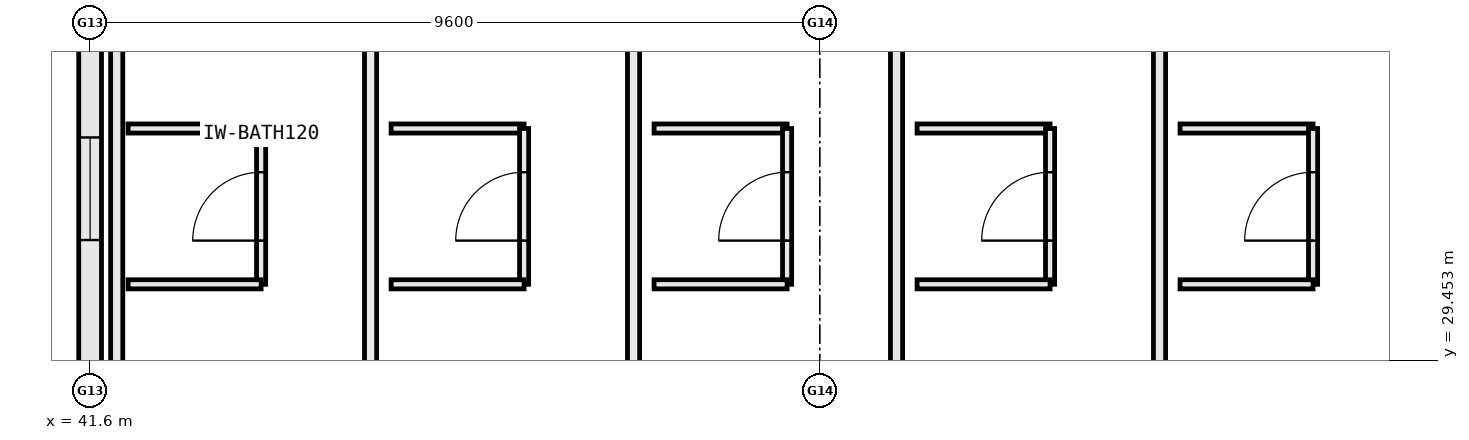
"""IFC4 building model, lengths in metres.
Left out: names, types, materials, properties, quantities, classifications, styles, units other than length and angle.
Written with IfcOpenShell. Run it as: python <this file> out.ifc"""

import sys

from ifc_helpers import new_model, si_unit, direction, frame, frame_2d, origin, place, context, subcontext, project, spatial, rectangle, extrude, element, fill, save


model = new_model("IFC4")
c1 = context("Model", 3, precision=1e-05, world=origin(), true_north=direction((0.0, 1.0)))
c2 = subcontext(c1, "Body", "Model", "MODEL_VIEW")
j1 = project(units=[si_unit("LENGTHUNIT", "METRE"), si_unit("PLANEANGLEUNIT", "RADIAN")], contexts=[c1])
p1 = place(None, origin())
s1 = spatial("IfcSite", under=j1, at=p1, CompositionType="ELEMENT")
p2 = place(p1, origin())
s2 = spatial("IfcBuilding", under=s1, at=p2, CompositionType="ELEMENT")
p3 = place(p2, frame((0.0, 0.0, 27.6)))
s3 = spatial("IfcBuildingStorey", under=s2, at=p3, CompositionType="ELEMENT", Elevation=27.6)
p4 = place(p3, frame((41.6, 36.192, 0.0), z_axis=(0.0, 0.0, 1.0), x_axis=(0.0, -1.0, 0.0)))
e1 = element("IfcWall", 1, at=p4, inside=s3, PredefinedType="STANDARD", context=c2, shape_type="SweptSolid", body=[
    extrude(rectangle(XDim=8.969, YDim=0.3, at=frame_2d((4.484, 0.0))), origin(), (0.0, 0.0, 1.0), 2.93),
])
p5 = place(p4, frame((3.81, 0.0, 0.85)))
e2 = element("IfcOpeningElement", 2, at=p5, cuts=e1, PredefinedType="OPENING", context=c2, shape_type="SweptSolid", body=[
    extrude(rectangle(XDim=1.35, YDim=1.65, at=frame_2d((0.675, 0.825))), frame((0.0, 0.162, 0.0), z_axis=(0.0, -1.0, 0.0), x_axis=(1.0, 0.0, 0.0)), (0.0, 0.0, 1.0), 0.324),
])
p6 = place(p3, frame((41.95, 27.16, 0.0), z_axis=(0.0, 0.0, 1.0), x_axis=(0.0, 1.0, 0.0)))
e3 = element("IfcWall", 3, at=p6, inside=s3, PredefinedType="PARTITIONING", context=c2, shape_type="SweptSolid", body=[
    extrude(rectangle(XDim=10.34, YDim=0.16, at=frame_2d((5.17, 0.0))), origin(), (0.0, 0.0, 1.0), 2.91),
])
p7 = place(p3, frame((45.29, 27.16, 0.0), z_axis=(0.0, 0.0, 1.0), x_axis=(0.0, 1.0, 0.0)))
e4 = element("IfcWall", 4, at=p7, inside=s3, PredefinedType="PARTITIONING", context=c2, shape_type="SweptSolid", body=[
    extrude(rectangle(XDim=10.34, YDim=0.16, at=frame_2d((5.17, 0.0))), origin(), (0.0, 0.0, 1.0), 3.555),
])
p8 = place(p3, frame((42.1, 32.5, 0.0), z_axis=(0.0, 0.0, 1.0), x_axis=(1.0, 0.0, 0.0)))
e5 = element("IfcWall", 5, at=p8, inside=s3, PredefinedType="PARTITIONING", context=c2, shape_type="SweptSolid", body=[
    extrude(rectangle(XDim=1.75, YDim=0.12, at=frame_2d((0.875, 0.0))), origin(), (0.0, 0.0, 1.0), 3.555),
])
p9 = place(p3, frame((43.85, 30.45, 0.0), z_axis=(0.0, 0.0, 1.0), x_axis=(0.0, 1.0, 0.0)))
e6 = element("IfcWall", 6, at=p9, inside=s3, PredefinedType="PARTITIONING", context=c2, shape_type="SweptSolid", body=[
    extrude(rectangle(XDim=2.05, YDim=0.12, at=frame_2d((1.025, 0.0))), origin(), (0.0, 0.0, 1.0), 3.1),
])
p10 = place(p9, frame((0.575, 0.0, 0.0)))
e7 = element("IfcOpeningElement", 7, at=p10, cuts=e6, PredefinedType="OPENING", context=c2, shape_type="SweptSolid", body=[
    extrude(rectangle(XDim=0.9, YDim=2.15, at=frame_2d((0.45, 1.075))), frame((0.0, 0.072, 0.0), z_axis=(0.0, -1.0, 0.0), x_axis=(1.0, 0.0, 0.0)), (0.0, 0.0, 1.0), 0.144),
])
p11 = place(p3, frame((42.1, 30.45, 0.0), z_axis=(0.0, 0.0, 1.0), x_axis=(1.0, 0.0, 0.0)))
e8 = element("IfcWall", 8, at=p11, inside=s3, PredefinedType="PARTITIONING", context=c2, shape_type="SweptSolid", body=[
    extrude(rectangle(XDim=1.75, YDim=0.12, at=frame_2d((0.875, 0.0))), origin(), (0.0, 0.0, 1.0), 3.555),
])
p12 = place(p3, frame((48.75, 27.16, 0.0), z_axis=(0.0, 0.0, 1.0), x_axis=(0.0, 1.0, 0.0)))
e9 = element("IfcWall", 9, at=p12, inside=s3, PredefinedType="PARTITIONING", context=c2, shape_type="SweptSolid", body=[
    extrude(rectangle(XDim=10.34, YDim=0.16, at=frame_2d((5.17, 0.0))), origin(), (0.0, 0.0, 1.0), 3.1),
])
p13 = place(p3, frame((45.56, 32.5, 0.0), z_axis=(0.0, 0.0, 1.0), x_axis=(1.0, 0.0, 0.0)))
e10 = element("IfcWall", 10, at=p13, inside=s3, PredefinedType="PARTITIONING", context=c2, shape_type="SweptSolid", body=[
    extrude(rectangle(XDim=1.75, YDim=0.12, at=frame_2d((0.875, 0.0))), origin(), (0.0, 0.0, 1.0), 3.555),
])
p14 = place(p3, frame((47.31, 30.45, 0.0), z_axis=(0.0, 0.0, 1.0), x_axis=(0.0, 1.0, 0.0)))
e11 = element("IfcWall", 11, at=p14, inside=s3, PredefinedType="PARTITIONING", context=c2, shape_type="SweptSolid", body=[
    extrude(rectangle(XDim=2.05, YDim=0.12, at=frame_2d((1.025, 0.0))), origin(), (0.0, 0.0, 1.0), 3.555),
])
p15 = place(p14, frame((0.575, 0.0, 0.0)))
e12 = element("IfcOpeningElement", 12, at=p15, cuts=e11, PredefinedType="OPENING", context=c2, shape_type="SweptSolid", body=[
    extrude(rectangle(XDim=0.9, YDim=2.15, at=frame_2d((0.45, 1.075))), frame((0.0, 0.072, 0.0), z_axis=(0.0, -1.0, 0.0), x_axis=(1.0, 0.0, 0.0)), (0.0, 0.0, 1.0), 0.144),
])
p16 = place(p3, frame((45.56, 30.45, 0.0), z_axis=(0.0, 0.0, 1.0), x_axis=(1.0, 0.0, 0.0)))
e13 = element("IfcWall", 13, at=p16, inside=s3, PredefinedType="PARTITIONING", context=c2, shape_type="SweptSolid", body=[
    extrude(rectangle(XDim=1.75, YDim=0.12, at=frame_2d((0.875, 0.0))), origin(), (0.0, 0.0, 1.0), 3.555),
])
p17 = place(p3, frame((52.21, 27.16, 0.0), z_axis=(0.0, 0.0, 1.0), x_axis=(0.0, 1.0, 0.0)))
e14 = element("IfcWall", 14, at=p17, inside=s3, PredefinedType="PARTITIONING", context=c2, shape_type="SweptSolid", body=[
    extrude(rectangle(XDim=10.34, YDim=0.16, at=frame_2d((5.17, 0.0))), origin(), (0.0, 0.0, 1.0), 3.555),
])
p18 = place(p3, frame((49.02, 32.5, 0.0), z_axis=(0.0, 0.0, 1.0), x_axis=(1.0, 0.0, 0.0)))
e15 = element("IfcWall", 15, at=p18, inside=s3, PredefinedType="PARTITIONING", context=c2, shape_type="SweptSolid", body=[
    extrude(rectangle(XDim=1.75, YDim=0.12, at=frame_2d((0.875, 0.0))), origin(), (0.0, 0.0, 1.0), 3.555),
])
p19 = place(p3, frame((50.77, 30.45, 0.0), z_axis=(0.0, 0.0, 1.0), x_axis=(0.0, 1.0, 0.0)))
e16 = element("IfcWall", 16, at=p19, inside=s3, PredefinedType="PARTITIONING", context=c2, shape_type="SweptSolid", body=[
    extrude(rectangle(XDim=2.05, YDim=0.12, at=frame_2d((1.025, 0.0))), origin(), (0.0, 0.0, 1.0), 3.555),
])
p20 = place(p19, frame((0.575, 0.0, 0.0)))
e17 = element("IfcOpeningElement", 17, at=p20, cuts=e16, PredefinedType="OPENING", context=c2, shape_type="SweptSolid", body=[
    extrude(rectangle(XDim=0.9, YDim=2.15, at=frame_2d((0.45, 1.075))), frame((0.0, 0.072, 0.0), z_axis=(0.0, -1.0, 0.0), x_axis=(1.0, 0.0, 0.0)), (0.0, 0.0, 1.0), 0.144),
])
p21 = place(p3, frame((49.02, 30.45, 0.0), z_axis=(0.0, 0.0, 1.0), x_axis=(1.0, 0.0, 0.0)))
e18 = element("IfcWall", 18, at=p21, inside=s3, PredefinedType="PARTITIONING", context=c2, shape_type="SweptSolid", body=[
    extrude(rectangle(XDim=1.75, YDim=0.12, at=frame_2d((0.875, 0.0))), origin(), (0.0, 0.0, 1.0), 3.555),
])
p22 = place(p3, frame((55.67, 27.16, 0.0), z_axis=(0.0, 0.0, 1.0), x_axis=(0.0, 1.0, 0.0)))
e19 = element("IfcWall", 19, at=p22, inside=s3, PredefinedType="PARTITIONING", context=c2, shape_type="SweptSolid", body=[
    extrude(rectangle(XDim=10.34, YDim=0.16, at=frame_2d((5.17, 0.0))), origin(), (0.0, 0.0, 1.0), 3.555),
])
p23 = place(p3, frame((52.48, 32.5, 0.0), z_axis=(0.0, 0.0, 1.0), x_axis=(1.0, 0.0, 0.0)))
e20 = element("IfcWall", 20, at=p23, inside=s3, PredefinedType="PARTITIONING", context=c2, shape_type="SweptSolid", body=[
    extrude(rectangle(XDim=1.75, YDim=0.12, at=frame_2d((0.875, 0.0))), origin(), (0.0, 0.0, 1.0), 3.555),
])
p24 = place(p3, frame((54.23, 30.45, 0.0), z_axis=(0.0, 0.0, 1.0), x_axis=(0.0, 1.0, 0.0)))
e21 = element("IfcWall", 21, at=p24, inside=s3, PredefinedType="PARTITIONING", context=c2, shape_type="SweptSolid", body=[
    extrude(rectangle(XDim=2.05, YDim=0.12, at=frame_2d((1.025, 0.0))), origin(), (0.0, 0.0, 1.0), 3.1),
])
p25 = place(p24, frame((0.575, 0.0, 0.0)))
e22 = element("IfcOpeningElement", 22, at=p25, cuts=e21, PredefinedType="OPENING", context=c2, shape_type="SweptSolid", body=[
    extrude(rectangle(XDim=0.9, YDim=2.15, at=frame_2d((0.45, 1.075))), frame((0.0, 0.072, 0.0), z_axis=(0.0, -1.0, 0.0), x_axis=(1.0, 0.0, 0.0)), (0.0, 0.0, 1.0), 0.144),
])
for number, where, z_axis, x_axis in (
    (23, (52.48, 30.45, 0.0), (0.0, 0.0, 1.0), (1.0, 0.0, 0.0)),
    (24, (55.94, 32.5, 0.0), (0.0, 0.0, 1.0), (1.0, 0.0, 0.0)),
):
    element("IfcWall", number, at=place(p3, frame(where, z_axis=z_axis, x_axis=x_axis)), inside=s3, PredefinedType="PARTITIONING", context=c2, shape_type="SweptSolid", body=[
        extrude(rectangle(XDim=1.75, YDim=0.12, at=frame_2d((0.875, 0.0))), origin(), (0.0, 0.0, 1.0), 3.555),
    ])
p26 = place(p3, frame((57.69, 30.45, 0.0), z_axis=(0.0, 0.0, 1.0), x_axis=(0.0, 1.0, 0.0)))
e25 = element("IfcWall", 25, at=p26, inside=s3, PredefinedType="PARTITIONING", context=c2, shape_type="SweptSolid", body=[
    extrude(rectangle(XDim=2.05, YDim=0.12, at=frame_2d((1.025, 0.0))), origin(), (0.0, 0.0, 1.0), 3.1),
])
p27 = place(p26, frame((0.575, 0.0, 0.0)))
e26 = element("IfcOpeningElement", 26, at=p27, cuts=e25, PredefinedType="OPENING", context=c2, shape_type="SweptSolid", body=[
    extrude(rectangle(XDim=0.9, YDim=2.15, at=frame_2d((0.45, 1.075))), frame((0.0, 0.072, 0.0), z_axis=(0.0, -1.0, 0.0), x_axis=(1.0, 0.0, 0.0)), (0.0, 0.0, 1.0), 0.144),
])
p28 = place(p3, frame((55.94, 30.45, 0.0), z_axis=(0.0, 0.0, 1.0), x_axis=(1.0, 0.0, 0.0)))
e27 = element("IfcWall", 27, at=p28, inside=s3, PredefinedType="PARTITIONING", context=c2, shape_type="SweptSolid", body=[
    extrude(rectangle(XDim=1.75, YDim=0.12, at=frame_2d((0.875, 0.0))), origin(), (0.0, 0.0, 1.0), 3.555),
])
p29 = place(p5, origin())
e28 = element("IfcWindow", 28, at=p29, inside=s3, PartitioningType="SINGLE_PANEL", PredefinedType="WINDOW", context=c2, shape_type="SweptSolid", body=[
    extrude(rectangle(XDim=1.35, YDim=1.65, at=frame_2d((0.675, 0.825))), frame((0.0, 0.03, 0.0), z_axis=(0.0, -1.0, 0.0), x_axis=(1.0, 0.0, 0.0)), (0.0, 0.0, 1.0), 0.06),
])
fill(e2, e28)
p30 = place(p10, origin())
e29 = element("IfcDoor", 29, at=p30, inside=s3, OperationType="SINGLE_SWING_LEFT", PredefinedType="DOOR", context=c2, shape_type="SweptSolid", body=[
    extrude(rectangle(XDim=0.9, YDim=2.15, at=frame_2d((0.45, 1.075))), frame((0.0, 0.025, 0.0), z_axis=(0.0, -1.0, 0.0), x_axis=(1.0, 0.0, 0.0)), (0.0, 0.0, 1.0), 0.05),
])
fill(e7, e29)
p31 = place(p15, origin())
e30 = element("IfcDoor", 30, at=p31, inside=s3, OperationType="SINGLE_SWING_LEFT", PredefinedType="DOOR", context=c2, shape_type="SweptSolid", body=[
    extrude(rectangle(XDim=0.9, YDim=2.15, at=frame_2d((0.45, 1.075))), frame((0.0, 0.025, 0.0), z_axis=(0.0, -1.0, 0.0), x_axis=(1.0, 0.0, 0.0)), (0.0, 0.0, 1.0), 0.05),
])
fill(e12, e30)
p32 = place(p20, origin())
e31 = element("IfcDoor", 31, at=p32, inside=s3, OperationType="SINGLE_SWING_LEFT", PredefinedType="DOOR", context=c2, shape_type="SweptSolid", body=[
    extrude(rectangle(XDim=0.9, YDim=2.15, at=frame_2d((0.45, 1.075))), frame((0.0, 0.025, 0.0), z_axis=(0.0, -1.0, 0.0), x_axis=(1.0, 0.0, 0.0)), (0.0, 0.0, 1.0), 0.05),
])
fill(e17, e31)
p33 = place(p25, origin())
e32 = element("IfcDoor", 32, at=p33, inside=s3, OperationType="SINGLE_SWING_LEFT", PredefinedType="DOOR", context=c2, shape_type="SweptSolid", body=[
    extrude(rectangle(XDim=0.9, YDim=2.15, at=frame_2d((0.45, 1.075))), frame((0.0, 0.025, 0.0), z_axis=(0.0, -1.0, 0.0), x_axis=(1.0, 0.0, 0.0)), (0.0, 0.0, 1.0), 0.05),
])
fill(e22, e32)
p34 = place(p27, origin())
e33 = element("IfcDoor", 33, at=p34, inside=s3, OperationType="SINGLE_SWING_LEFT", PredefinedType="DOOR", context=c2, shape_type="SweptSolid", body=[
    extrude(rectangle(XDim=0.9, YDim=2.15, at=frame_2d((0.45, 1.075))), frame((0.0, 0.025, 0.0), z_axis=(0.0, -1.0, 0.0), x_axis=(1.0, 0.0, 0.0)), (0.0, 0.0, 1.0), 0.05),
])
fill(e26, e33)
save(model, sys.argv[1])
